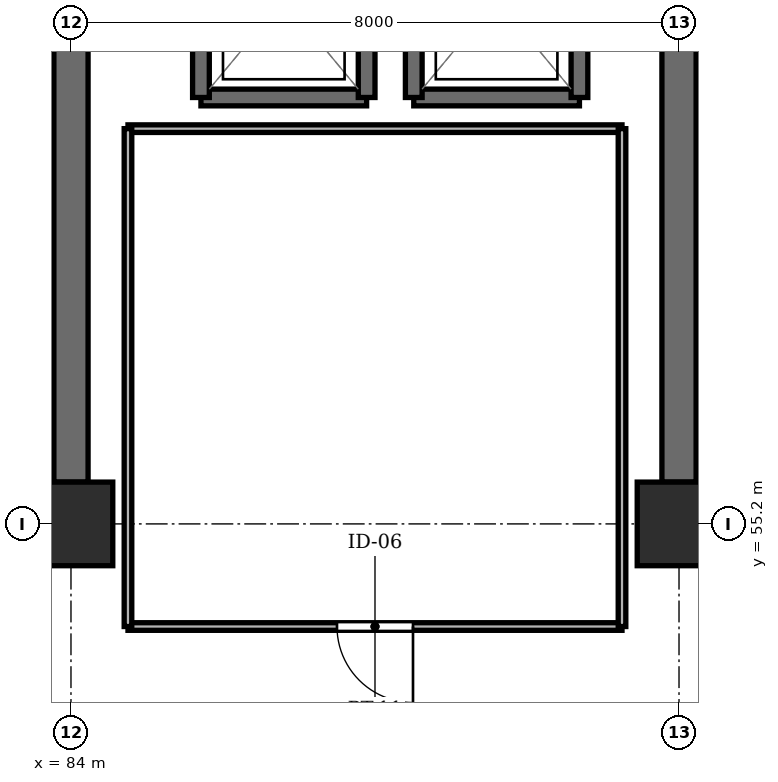
"""IFC4 building model, lengths in metres.
Left out: names, types, materials, properties, quantities, classifications, styles, units other than length and angle.
Written with IfcOpenShell. Run it as: python <this file> out.ifc"""

import sys

from ifc_helpers import new_model, si_unit, direction, frame, frame_2d, origin, origin_2d, place, context, subcontext, project, spatial, rectangle, extrude, element, fill, save


model = new_model("IFC4")
c1 = context("Model", 3, precision=1e-05, world=origin(), true_north=direction((0.0, 1.0)))
c2 = subcontext(c1, "Body", "Model", "MODEL_VIEW")
j1 = project(units=[si_unit("LENGTHUNIT", "METRE"), si_unit("PLANEANGLEUNIT", "RADIAN")], contexts=[c1])
p1 = place(None, origin())
s1 = spatial("IfcSite", under=j1, at=p1, CompositionType="ELEMENT")
p2 = place(p1, origin())
s2 = spatial("IfcBuilding", under=s1, at=p2, CompositionType="ELEMENT")
p3 = place(p2, frame((0.0, 0.0, 30.8)))
s3 = spatial("IfcBuildingStorey", under=s2, at=p3, CompositionType="ELEMENT", Elevation=30.8)
for number, where, z_axis, x_axis in (
    (1, (84.0, 55.2, -0.26), (0.0, 0.0, 1.0), (1.0, 0.0, 0.0)),
    (2, (92.0, 55.2, -0.26), (0.0, 0.0, 1.0), (1.0, 0.0, 0.0)),
):
    element("IfcColumn", number, at=place(p3, frame(where, z_axis=z_axis, x_axis=x_axis)), inside=s3, PredefinedType="COLUMN", context=c2, shape_type="SweptSolid", body=[
        extrude(rectangle(XDim=1.1, YDim=1.1, at=origin_2d()), origin(), (0.0, 0.0, 1.0), 3.26),
    ])
for number, where, z_axis, x_axis in (
    (3, (84.0, 55.75, 0.0), (0.0, 0.0, 1.0), (0.0, 1.0, 0.0)),
    (4, (92.0, 55.75, 0.0), (0.0, 0.0, 1.0), (0.0, 1.0, 0.0)),
):
    element("IfcWall", number, at=place(p3, frame(where, z_axis=z_axis, x_axis=x_axis)), inside=s3, PredefinedType="SHEAR", context=c2, shape_type="SweptSolid", body=[
        extrude(rectangle(XDim=6.2, YDim=0.45, at=frame_2d((3.1, 0.0))), origin(), (0.0, 0.0, 1.0), 3.0),
    ])
p4 = place(p3, frame((85.71, 60.81, 0.0), z_axis=(0.0, 0.0, 1.0), x_axis=(1.0, 0.0, 0.0)))
e5 = element("IfcWall", 5, at=p4, inside=s3, PredefinedType="SHEAR", context=c2, shape_type="SweptSolid", body=[
    extrude(rectangle(XDim=2.18, YDim=0.22, at=frame_2d((1.09, 0.0))), origin(), (0.0, 0.0, 1.0), 3.0),
])
for number, where, z_axis, x_axis in (
    (6, (85.71, 63.39, 0.0), (0.0, 0.0, 1.0), (0.0, -1.0, 0.0)),
    (7, (87.89, 60.81, 0.0), (0.0, 0.0, 1.0), (0.0, 1.0, 0.0)),
):
    element("IfcWall", number, at=place(p3, frame(where, z_axis=z_axis, x_axis=x_axis)), inside=s3, PredefinedType="SHEAR", context=c2, shape_type="SweptSolid", body=[
        extrude(rectangle(XDim=2.58, YDim=0.22, at=frame_2d((1.29, 0.0))), origin(), (0.0, 0.0, 1.0), 3.0),
    ])
p5 = place(p3, frame((88.51, 60.81, 0.0), z_axis=(0.0, 0.0, 1.0), x_axis=(1.0, 0.0, 0.0)))
e8 = element("IfcWall", 8, at=p5, inside=s3, PredefinedType="SHEAR", context=c2, shape_type="SweptSolid", body=[
    extrude(rectangle(XDim=2.18, YDim=0.22, at=frame_2d((1.09, 0.0))), origin(), (0.0, 0.0, 1.0), 3.0),
])
for number, where, z_axis, x_axis in (
    (9, (88.51, 63.39, 0.0), (0.0, 0.0, 1.0), (0.0, -1.0, 0.0)),
    (10, (90.69, 60.81, 0.0), (0.0, 0.0, 1.0), (0.0, 1.0, 0.0)),
):
    element("IfcWall", number, at=place(p3, frame(where, z_axis=z_axis, x_axis=x_axis)), inside=s3, PredefinedType="SHEAR", context=c2, shape_type="SweptSolid", body=[
        extrude(rectangle(XDim=2.58, YDim=0.22, at=frame_2d((1.29, 0.0))), origin(), (0.0, 0.0, 1.0), 3.0),
    ])
p6 = place(p3, frame((84.75, 53.85, 0.0), z_axis=(0.0, 0.0, 1.0), x_axis=(1.0, 0.0, 0.0)))
e11 = element("IfcWall", 11, at=p6, inside=s3, PredefinedType="PARTITIONING", context=c2, shape_type="SweptSolid", body=[
    extrude(rectangle(XDim=6.5, YDim=0.1, at=frame_2d((3.25, 0.0))), origin(), (0.0, 0.0, 1.0), 2.53),
])
p7 = place(p6, frame((2.75, 0.0, 0.0)))
e12 = element("IfcOpeningElement", 12, at=p7, cuts=e11, PredefinedType="OPENING", context=c2, shape_type="SweptSolid", body=[
    extrude(rectangle(XDim=1.0, YDim=2.15, at=frame_2d((0.5, 1.075))), frame((0.0, 0.062, 0.0), z_axis=(0.0, -1.0, 0.0), x_axis=(1.0, 0.0, 0.0)), (0.0, 0.0, 1.0), 0.124),
])
p8 = place(p3, frame((84.75, 60.4, 0.0), z_axis=(0.0, 0.0, 1.0), x_axis=(1.0, 0.0, 0.0)))
e13 = element("IfcWall", 13, at=p8, inside=s3, PredefinedType="PARTITIONING", context=c2, shape_type="SweptSolid", body=[
    extrude(rectangle(XDim=6.5, YDim=0.1, at=frame_2d((3.25, 0.0))), origin(), (0.0, 0.0, 1.0), 2.53),
])
for number, where, z_axis, x_axis in (
    (14, (84.75, 53.85, 0.0), (0.0, 0.0, 1.0), (0.0, 1.0, 0.0)),
    (15, (91.25, 53.85, 0.0), (0.0, 0.0, 1.0), (0.0, 1.0, 0.0)),
):
    element("IfcWall", number, at=place(p3, frame(where, z_axis=z_axis, x_axis=x_axis)), inside=s3, PredefinedType="PARTITIONING", context=c2, shape_type="SweptSolid", body=[
        extrude(rectangle(XDim=6.55, YDim=0.1, at=frame_2d((3.275, 0.0))), origin(), (0.0, 0.0, 1.0), 2.53),
    ])
p9 = place(p7, frame((1.0, 0.0, 0.0), z_axis=(0.0, 0.0, 1.0), x_axis=(-1.0, 0.0, 0.0)))
e16 = element("IfcDoor", 16, at=p9, inside=s3, OperationType="SINGLE_SWING_RIGHT", PredefinedType="DOOR", context=c2, shape_type="SweptSolid", body=[
    extrude(rectangle(XDim=1.0, YDim=2.15, at=frame_2d((0.5, 1.075))), frame((0.0, 0.025, 0.0), z_axis=(0.0, -1.0, 0.0), x_axis=(1.0, 0.0, 0.0)), (0.0, 0.0, 1.0), 0.05),
])
fill(e12, e16)
save(model, sys.argv[1])
